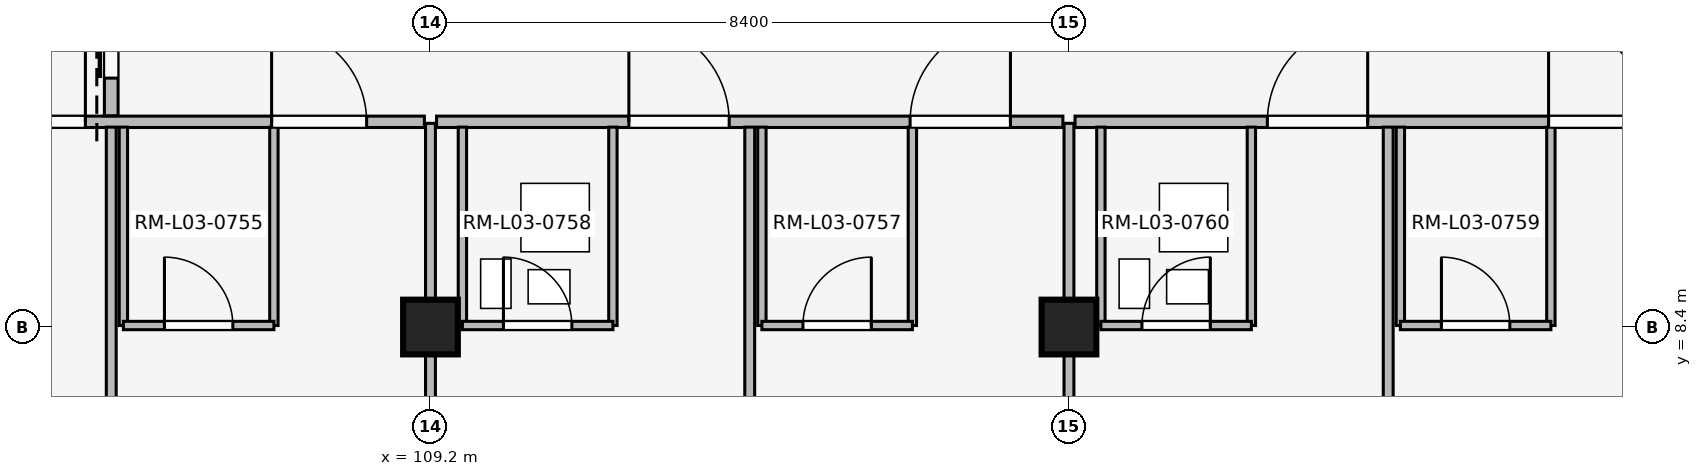
"""IFC4 building model, lengths in metres.
Left out: names, types, materials, properties, quantities, classifications, styles, units other than length and angle.
Written with IfcOpenShell. Run it as: python <this file> out.ifc"""

import sys

from ifc_helpers import new_model, si_unit, direction, frame, frame_2d, origin, origin_2d, place, context, subcontext, project, spatial, rectangle, extrude, element, fill, save


model = new_model("IFC4")
c1 = context("Model", 3, precision=1e-05, world=origin(), true_north=direction((0.0, 1.0)))
c2 = subcontext(c1, "Body", "Model", "MODEL_VIEW")
j1 = project(units=[si_unit("LENGTHUNIT", "METRE"), si_unit("PLANEANGLEUNIT", "RADIAN")], contexts=[c1])
p1 = place(None, origin())
s1 = spatial("IfcSite", under=j1, at=p1, CompositionType="ELEMENT")
p2 = place(p1, origin())
s2 = spatial("IfcBuilding", under=s1, at=p2, CompositionType="ELEMENT")
p3 = place(p2, frame((0.0, 0.0, 12.9)))
s3 = spatial("IfcBuildingStorey", under=s2, at=p3, CompositionType="ELEMENT", Elevation=12.9)
for number, where, z_axis, x_axis in (
    (1, (109.2, 8.4, 0.0), (0.0, 0.0, 1.0), (1.0, 0.0, 0.0)),
    (2, (117.6, 8.4, 0.0), (0.0, 0.0, 1.0), (1.0, 0.0, 0.0)),
):
    element("IfcColumn", number, at=place(p3, frame(where, z_axis=z_axis, x_axis=x_axis)), inside=s3, PredefinedType="COLUMN", context=c2, shape_type="SweptSolid", body=[
        extrude(rectangle(XDim=0.72, YDim=0.72, at=origin_2d()), origin(), (0.0, 0.0, 1.0), 3.3),
    ])
p4 = place(p3, frame((101.16, 11.1, 0.0), z_axis=(0.0, 0.0, 1.0), x_axis=(1.0, 0.0, 0.0)))
e3 = element("IfcWall", 3, at=p4, inside=s3, PredefinedType="PARTITIONING", context=c2, shape_type="SweptSolid", body=[
    extrude(rectangle(XDim=7.96, YDim=0.15, at=frame_2d((3.98, 0.0))), origin(), (0.0, 0.0, 1.0), 2.42),
])
p5 = place(p4, frame((2.25, 0.0, 0.0)))
e4 = element("IfcOpeningElement", 4, at=p5, cuts=e3, PredefinedType="OPENING", context=c2, shape_type="SweptSolid", body=[
    extrude(rectangle(XDim=1.25, YDim=2.2, at=frame_2d((0.625, 1.1))), frame((0.0, 0.085, 0.0), z_axis=(0.0, -1.0, 0.0), x_axis=(1.0, 0.0, 0.0)), (0.0, 0.0, 1.0), 0.17),
])
p6 = place(p4, frame((5.95, 0.0, 0.0)))
e5 = element("IfcOpeningElement", 5, at=p6, cuts=e3, PredefinedType="OPENING", context=c2, shape_type="SweptSolid", body=[
    extrude(rectangle(XDim=1.25, YDim=2.2, at=frame_2d((0.625, 1.1))), frame((0.0, 0.085, 0.0), z_axis=(0.0, -1.0, 0.0), x_axis=(1.0, 0.0, 0.0)), (0.0, 0.0, 1.0), 0.17),
])
p7 = place(p3, frame((105.0, 0.1, 0.0), z_axis=(0.0, 0.0, 1.0), x_axis=(0.0, 1.0, 0.0)))
e6 = element("IfcWall", 6, at=p7, inside=s3, PredefinedType="PARTITIONING", context=c2, shape_type="SweptSolid", body=[
    extrude(rectangle(XDim=10.93, YDim=0.13, at=frame_2d((5.465, 0.0))), origin(), (0.0, 0.0, 1.0), 2.42),
])
for number, where, z_axis, x_axis in (
    (7, (105.16, 8.42, 0.0), (0.0, 0.0, 1.0), (0.0, 1.0, 0.0)),
    (8, (107.14, 8.42, 0.0), (0.0, 0.0, 1.0), (0.0, 1.0, 0.0)),
):
    element("IfcWall", number, at=place(p3, frame(where, z_axis=z_axis, x_axis=x_axis)), inside=s3, PredefinedType="PARTITIONING", context=c2, shape_type="SweptSolid", body=[
        extrude(rectangle(XDim=2.61, YDim=0.11, at=frame_2d((1.305, 0.0))), origin(), (0.0, 0.0, 1.0), 2.42),
    ])
p8 = place(p3, frame((105.16, 8.42, 0.0), z_axis=(0.0, 0.0, 1.0), x_axis=(1.0, 0.0, 0.0)))
e9 = element("IfcWall", 9, at=p8, inside=s3, PredefinedType="PARTITIONING", context=c2, shape_type="SweptSolid", body=[
    extrude(rectangle(XDim=1.98, YDim=0.11, at=frame_2d((0.99, 0.0))), origin(), (0.0, 0.0, 1.0), 2.42),
])
p9 = place(p8, frame((0.54, 0.0, 0.0)))
e10 = element("IfcOpeningElement", 10, at=p9, cuts=e9, PredefinedType="OPENING", context=c2, shape_type="SweptSolid", body=[
    extrude(rectangle(XDim=0.9, YDim=2.1, at=frame_2d((0.45, 1.05))), frame((0.0, 0.065, 0.0), z_axis=(0.0, -1.0, 0.0), x_axis=(1.0, 0.0, 0.0)), (0.0, 0.0, 1.0), 0.13),
])
p10 = place(p3, frame((105.0, 11.18, 0.0), z_axis=(0.0, 0.0, 1.0), x_axis=(0.0, 1.0, 0.0)))
e11 = element("IfcWall", 11, at=p10, inside=s3, PredefinedType="PARTITIONING", context=c2, shape_type="SweptSolid", body=[
    extrude(rectangle(XDim=2.84, YDim=0.18, at=frame_2d((1.42, 0.0))), origin(), (0.0, 0.0, 1.0), 2.42),
])
p11 = place(p10, frame((0.495, 0.0, 0.0)))
e12 = element("IfcOpeningElement", 12, at=p11, cuts=e11, PredefinedType="OPENING", context=c2, shape_type="SweptSolid", body=[
    extrude(rectangle(XDim=1.85, YDim=2.3, at=frame_2d((0.925, 1.15))), frame((0.0, 0.1, 0.0), z_axis=(0.0, -1.0, 0.0), x_axis=(1.0, 0.0, 0.0)), (0.0, 0.0, 1.0), 0.2),
])
p12 = place(p3, frame((109.2, 0.14, 0.0), z_axis=(0.0, 0.0, 1.0), x_axis=(0.0, 1.0, 0.0)))
e13 = element("IfcWall", 13, at=p12, inside=s3, PredefinedType="PARTITIONING", context=c2, shape_type="SweptSolid", body=[
    extrude(rectangle(XDim=10.94, YDim=0.13, at=frame_2d((5.47, 0.0))), origin(), (0.0, 0.0, 1.0), 2.42),
])
p13 = place(p3, frame((109.28, 11.1, 0.0), z_axis=(0.0, 0.0, 1.0), x_axis=(1.0, 0.0, 0.0)))
e14 = element("IfcWall", 14, at=p13, inside=s3, PredefinedType="PARTITIONING", context=c2, shape_type="SweptSolid", body=[
    extrude(rectangle(XDim=8.24, YDim=0.15, at=frame_2d((4.12, 0.0))), origin(), (0.0, 0.0, 1.0), 2.42),
])
p14 = place(p13, frame((2.53, 0.0, 0.0)))
e15 = element("IfcOpeningElement", 15, at=p14, cuts=e14, PredefinedType="OPENING", context=c2, shape_type="SweptSolid", body=[
    extrude(rectangle(XDim=1.32, YDim=2.25, at=frame_2d((0.66, 1.125))), frame((0.0, 0.085, 0.0), z_axis=(0.0, -1.0, 0.0), x_axis=(1.0, 0.0, 0.0)), (0.0, 0.0, 1.0), 0.17),
])
p15 = place(p13, frame((6.23, 0.0, 0.0)))
e16 = element("IfcOpeningElement", 16, at=p15, cuts=e14, PredefinedType="OPENING", context=c2, shape_type="SweptSolid", body=[
    extrude(rectangle(XDim=1.32, YDim=2.25, at=frame_2d((0.66, 1.125))), frame((0.0, 0.085, 0.0), z_axis=(0.0, -1.0, 0.0), x_axis=(1.0, 0.0, 0.0)), (0.0, 0.0, 1.0), 0.17),
])
p16 = place(p3, frame((113.4, 0.1, 0.0), z_axis=(0.0, 0.0, 1.0), x_axis=(0.0, 1.0, 0.0)))
e17 = element("IfcWall", 17, at=p16, inside=s3, PredefinedType="PARTITIONING", context=c2, shape_type="SweptSolid", body=[
    extrude(rectangle(XDim=10.93, YDim=0.13, at=frame_2d((5.465, 0.0))), origin(), (0.0, 0.0, 1.0), 2.42),
])
for number, where, z_axis, x_axis in (
    (18, (109.62, 8.42, 0.0), (0.0, 0.0, 1.0), (0.0, 1.0, 0.0)),
    (19, (111.6, 8.42, 0.0), (0.0, 0.0, 1.0), (0.0, 1.0, 0.0)),
):
    element("IfcWall", number, at=place(p3, frame(where, z_axis=z_axis, x_axis=x_axis)), inside=s3, PredefinedType="PARTITIONING", context=c2, shape_type="SweptSolid", body=[
        extrude(rectangle(XDim=2.61, YDim=0.11, at=frame_2d((1.305, 0.0))), origin(), (0.0, 0.0, 1.0), 2.42),
    ])
p17 = place(p3, frame((109.62, 8.42, 0.0), z_axis=(0.0, 0.0, 1.0), x_axis=(1.0, 0.0, 0.0)))
e20 = element("IfcWall", 20, at=p17, inside=s3, PredefinedType="PARTITIONING", context=c2, shape_type="SweptSolid", body=[
    extrude(rectangle(XDim=1.98, YDim=0.11, at=frame_2d((0.99, 0.0))), origin(), (0.0, 0.0, 1.0), 2.42),
])
p18 = place(p17, frame((0.54, 0.0, 0.0)))
e21 = element("IfcOpeningElement", 21, at=p18, cuts=e20, PredefinedType="OPENING", context=c2, shape_type="SweptSolid", body=[
    extrude(rectangle(XDim=0.9, YDim=2.1, at=frame_2d((0.45, 1.05))), frame((0.0, 0.065, 0.0), z_axis=(0.0, -1.0, 0.0), x_axis=(1.0, 0.0, 0.0)), (0.0, 0.0, 1.0), 0.13),
])
for number, where, z_axis, x_axis in (
    (22, (113.56, 8.42, 0.0), (0.0, 0.0, 1.0), (0.0, 1.0, 0.0)),
    (23, (115.54, 8.42, 0.0), (0.0, 0.0, 1.0), (0.0, 1.0, 0.0)),
):
    element("IfcWall", number, at=place(p3, frame(where, z_axis=z_axis, x_axis=x_axis)), inside=s3, PredefinedType="PARTITIONING", context=c2, shape_type="SweptSolid", body=[
        extrude(rectangle(XDim=2.61, YDim=0.11, at=frame_2d((1.305, 0.0))), origin(), (0.0, 0.0, 1.0), 2.42),
    ])
p19 = place(p3, frame((113.56, 8.42, 0.0), z_axis=(0.0, 0.0, 1.0), x_axis=(1.0, 0.0, 0.0)))
e24 = element("IfcWall", 24, at=p19, inside=s3, PredefinedType="PARTITIONING", context=c2, shape_type="SweptSolid", body=[
    extrude(rectangle(XDim=1.98, YDim=0.11, at=frame_2d((0.99, 0.0))), origin(), (0.0, 0.0, 1.0), 2.42),
])
p20 = place(p19, frame((0.54, 0.0, 0.0)))
e25 = element("IfcOpeningElement", 25, at=p20, cuts=e24, PredefinedType="OPENING", context=c2, shape_type="SweptSolid", body=[
    extrude(rectangle(XDim=0.9, YDim=2.1, at=frame_2d((0.45, 1.05))), frame((0.0, 0.065, 0.0), z_axis=(0.0, -1.0, 0.0), x_axis=(1.0, 0.0, 0.0)), (0.0, 0.0, 1.0), 0.13),
])
p21 = place(p3, frame((117.6, 0.14, 0.0), z_axis=(0.0, 0.0, 1.0), x_axis=(0.0, 1.0, 0.0)))
e26 = element("IfcWall", 26, at=p21, inside=s3, PredefinedType="PARTITIONING", context=c2, shape_type="SweptSolid", body=[
    extrude(rectangle(XDim=10.94, YDim=0.13, at=frame_2d((5.47, 0.0))), origin(), (0.0, 0.0, 1.0), 2.42),
])
p22 = place(p3, frame((117.68, 11.1, 0.0), z_axis=(0.0, 0.0, 1.0), x_axis=(1.0, 0.0, 0.0)))
e27 = element("IfcWall", 27, at=p22, inside=s3, PredefinedType="PARTITIONING", context=c2, shape_type="SweptSolid", body=[
    extrude(rectangle(XDim=8.24, YDim=0.15, at=frame_2d((4.12, 0.0))), origin(), (0.0, 0.0, 1.0), 2.42),
])
p23 = place(p22, frame((2.53, 0.0, 0.0)))
e28 = element("IfcOpeningElement", 28, at=p23, cuts=e27, PredefinedType="OPENING", context=c2, shape_type="SweptSolid", body=[
    extrude(rectangle(XDim=1.32, YDim=2.25, at=frame_2d((0.66, 1.125))), frame((0.0, 0.085, 0.0), z_axis=(0.0, -1.0, 0.0), x_axis=(1.0, 0.0, 0.0)), (0.0, 0.0, 1.0), 0.17),
])
p24 = place(p22, frame((6.23, 0.0, 0.0)))
e29 = element("IfcOpeningElement", 29, at=p24, cuts=e27, PredefinedType="OPENING", context=c2, shape_type="SweptSolid", body=[
    extrude(rectangle(XDim=1.32, YDim=2.25, at=frame_2d((0.66, 1.125))), frame((0.0, 0.085, 0.0), z_axis=(0.0, -1.0, 0.0), x_axis=(1.0, 0.0, 0.0)), (0.0, 0.0, 1.0), 0.17),
])
p25 = place(p3, frame((121.8, 0.1, 0.0), z_axis=(0.0, 0.0, 1.0), x_axis=(0.0, 1.0, 0.0)))
e30 = element("IfcWall", 30, at=p25, inside=s3, PredefinedType="PARTITIONING", context=c2, shape_type="SweptSolid", body=[
    extrude(rectangle(XDim=10.93, YDim=0.13, at=frame_2d((5.465, 0.0))), origin(), (0.0, 0.0, 1.0), 2.42),
])
for number, where, z_axis, x_axis in (
    (31, (118.02, 8.42, 0.0), (0.0, 0.0, 1.0), (0.0, 1.0, 0.0)),
    (32, (120.0, 8.42, 0.0), (0.0, 0.0, 1.0), (0.0, 1.0, 0.0)),
):
    element("IfcWall", number, at=place(p3, frame(where, z_axis=z_axis, x_axis=x_axis)), inside=s3, PredefinedType="PARTITIONING", context=c2, shape_type="SweptSolid", body=[
        extrude(rectangle(XDim=2.61, YDim=0.11, at=frame_2d((1.305, 0.0))), origin(), (0.0, 0.0, 1.0), 2.42),
    ])
p26 = place(p3, frame((118.02, 8.42, 0.0), z_axis=(0.0, 0.0, 1.0), x_axis=(1.0, 0.0, 0.0)))
e33 = element("IfcWall", 33, at=p26, inside=s3, PredefinedType="PARTITIONING", context=c2, shape_type="SweptSolid", body=[
    extrude(rectangle(XDim=1.98, YDim=0.11, at=frame_2d((0.99, 0.0))), origin(), (0.0, 0.0, 1.0), 2.42),
])
p27 = place(p26, frame((0.54, 0.0, 0.0)))
e34 = element("IfcOpeningElement", 34, at=p27, cuts=e33, PredefinedType="OPENING", context=c2, shape_type="SweptSolid", body=[
    extrude(rectangle(XDim=0.9, YDim=2.1, at=frame_2d((0.45, 1.05))), frame((0.0, 0.065, 0.0), z_axis=(0.0, -1.0, 0.0), x_axis=(1.0, 0.0, 0.0)), (0.0, 0.0, 1.0), 0.13),
])
for number, where, z_axis, x_axis in (
    (35, (121.96, 8.42, 0.0), (0.0, 0.0, 1.0), (0.0, 1.0, 0.0)),
    (36, (123.94, 8.42, 0.0), (0.0, 0.0, 1.0), (0.0, 1.0, 0.0)),
):
    element("IfcWall", number, at=place(p3, frame(where, z_axis=z_axis, x_axis=x_axis)), inside=s3, PredefinedType="PARTITIONING", context=c2, shape_type="SweptSolid", body=[
        extrude(rectangle(XDim=2.61, YDim=0.11, at=frame_2d((1.305, 0.0))), origin(), (0.0, 0.0, 1.0), 2.42),
    ])
p28 = place(p3, frame((121.96, 8.42, 0.0), z_axis=(0.0, 0.0, 1.0), x_axis=(1.0, 0.0, 0.0)))
e37 = element("IfcWall", 37, at=p28, inside=s3, PredefinedType="PARTITIONING", context=c2, shape_type="SweptSolid", body=[
    extrude(rectangle(XDim=1.98, YDim=0.11, at=frame_2d((0.99, 0.0))), origin(), (0.0, 0.0, 1.0), 2.42),
])
p29 = place(p28, frame((0.54, 0.0, 0.0)))
e38 = element("IfcOpeningElement", 38, at=p29, cuts=e37, PredefinedType="OPENING", context=c2, shape_type="SweptSolid", body=[
    extrude(rectangle(XDim=0.9, YDim=2.1, at=frame_2d((0.45, 1.05))), frame((0.0, 0.065, 0.0), z_axis=(0.0, -1.0, 0.0), x_axis=(1.0, 0.0, 0.0)), (0.0, 0.0, 1.0), 0.13),
])
p30 = place(p5, origin())
e39 = element("IfcDoor", 39, at=p30, inside=s3, OperationType="SINGLE_SWING_RIGHT", PredefinedType="DOOR", context=c2, shape_type="SweptSolid", body=[
    extrude(rectangle(XDim=1.25, YDim=2.2, at=frame_2d((0.625, 1.1))), frame((0.0, 0.025, 0.0), z_axis=(0.0, -1.0, 0.0), x_axis=(1.0, 0.0, 0.0)), (0.0, 0.0, 1.0), 0.05),
])
fill(e4, e39)
p31 = place(p6, origin())
e40 = element("IfcDoor", 40, at=p31, inside=s3, OperationType="SINGLE_SWING_LEFT", PredefinedType="DOOR", context=c2, shape_type="SweptSolid", body=[
    extrude(rectangle(XDim=1.25, YDim=2.2, at=frame_2d((0.625, 1.1))), frame((0.0, 0.025, 0.0), z_axis=(0.0, -1.0, 0.0), x_axis=(1.0, 0.0, 0.0)), (0.0, 0.0, 1.0), 0.05),
])
fill(e5, e40)
p32 = place(p9, origin())
e41 = element("IfcDoor", 41, at=p32, inside=s3, OperationType="SINGLE_SWING_LEFT", PredefinedType="DOOR", context=c2, shape_type="SweptSolid", body=[
    extrude(rectangle(XDim=0.9, YDim=2.1, at=frame_2d((0.45, 1.05))), frame((0.0, 0.025, 0.0), z_axis=(0.0, -1.0, 0.0), x_axis=(1.0, 0.0, 0.0)), (0.0, 0.0, 1.0), 0.05),
])
fill(e10, e41)
p33 = place(p11, origin())
e42 = element("IfcDoor", 42, at=p33, inside=s3, OperationType="SLIDING_TO_LEFT", PredefinedType="DOOR", context=c2, shape_type="SweptSolid", body=[
    extrude(rectangle(XDim=1.85, YDim=2.3, at=frame_2d((0.925, 1.15))), frame((0.0, 0.025, 0.0), z_axis=(0.0, -1.0, 0.0), x_axis=(1.0, 0.0, 0.0)), (0.0, 0.0, 1.0), 0.05),
])
fill(e12, e42)
p34 = place(p14, origin())
e43 = element("IfcDoor", 43, at=p34, inside=s3, OperationType="SINGLE_SWING_LEFT", PredefinedType="DOOR", context=c2, shape_type="SweptSolid", body=[
    extrude(rectangle(XDim=1.32, YDim=2.25, at=frame_2d((0.66, 1.125))), frame((0.0, 0.025, 0.0), z_axis=(0.0, -1.0, 0.0), x_axis=(1.0, 0.0, 0.0)), (0.0, 0.0, 1.0), 0.05),
])
fill(e15, e43)
p35 = place(p15, origin())
e44 = element("IfcDoor", 44, at=p35, inside=s3, OperationType="SINGLE_SWING_RIGHT", PredefinedType="DOOR", context=c2, shape_type="SweptSolid", body=[
    extrude(rectangle(XDim=1.32, YDim=2.25, at=frame_2d((0.66, 1.125))), frame((0.0, 0.025, 0.0), z_axis=(0.0, -1.0, 0.0), x_axis=(1.0, 0.0, 0.0)), (0.0, 0.0, 1.0), 0.05),
])
fill(e16, e44)
p36 = place(p18, origin())
e45 = element("IfcDoor", 45, at=p36, inside=s3, OperationType="SINGLE_SWING_LEFT", PredefinedType="DOOR", context=c2, shape_type="SweptSolid", body=[
    extrude(rectangle(XDim=0.9, YDim=2.1, at=frame_2d((0.45, 1.05))), frame((0.0, 0.025, 0.0), z_axis=(0.0, -1.0, 0.0), x_axis=(1.0, 0.0, 0.0)), (0.0, 0.0, 1.0), 0.05),
])
fill(e21, e45)
p37 = place(p20, origin())
e46 = element("IfcDoor", 46, at=p37, inside=s3, OperationType="SINGLE_SWING_RIGHT", PredefinedType="DOOR", context=c2, shape_type="SweptSolid", body=[
    extrude(rectangle(XDim=0.9, YDim=2.1, at=frame_2d((0.45, 1.05))), frame((0.0, 0.025, 0.0), z_axis=(0.0, -1.0, 0.0), x_axis=(1.0, 0.0, 0.0)), (0.0, 0.0, 1.0), 0.05),
])
fill(e25, e46)
p38 = place(p23, origin())
e47 = element("IfcDoor", 47, at=p38, inside=s3, OperationType="SINGLE_SWING_RIGHT", PredefinedType="DOOR", context=c2, shape_type="SweptSolid", body=[
    extrude(rectangle(XDim=1.32, YDim=2.25, at=frame_2d((0.66, 1.125))), frame((0.0, 0.025, 0.0), z_axis=(0.0, -1.0, 0.0), x_axis=(1.0, 0.0, 0.0)), (0.0, 0.0, 1.0), 0.05),
])
fill(e28, e47)
p39 = place(p24, origin())
e48 = element("IfcDoor", 48, at=p39, inside=s3, OperationType="SINGLE_SWING_LEFT", PredefinedType="DOOR", context=c2, shape_type="SweptSolid", body=[
    extrude(rectangle(XDim=1.32, YDim=2.25, at=frame_2d((0.66, 1.125))), frame((0.0, 0.025, 0.0), z_axis=(0.0, -1.0, 0.0), x_axis=(1.0, 0.0, 0.0)), (0.0, 0.0, 1.0), 0.05),
])
fill(e29, e48)
p40 = place(p27, origin())
e49 = element("IfcDoor", 49, at=p40, inside=s3, OperationType="SINGLE_SWING_RIGHT", PredefinedType="DOOR", context=c2, shape_type="SweptSolid", body=[
    extrude(rectangle(XDim=0.9, YDim=2.1, at=frame_2d((0.45, 1.05))), frame((0.0, 0.025, 0.0), z_axis=(0.0, -1.0, 0.0), x_axis=(1.0, 0.0, 0.0)), (0.0, 0.0, 1.0), 0.05),
])
fill(e34, e49)
p41 = place(p29, origin())
e50 = element("IfcDoor", 50, at=p41, inside=s3, OperationType="SINGLE_SWING_LEFT", PredefinedType="DOOR", context=c2, shape_type="SweptSolid", body=[
    extrude(rectangle(XDim=0.9, YDim=2.1, at=frame_2d((0.45, 1.05))), frame((0.0, 0.025, 0.0), z_axis=(0.0, -1.0, 0.0), x_axis=(1.0, 0.0, 0.0)), (0.0, 0.0, 1.0), 0.05),
])
fill(e38, e50)
save(model, sys.argv[1])
